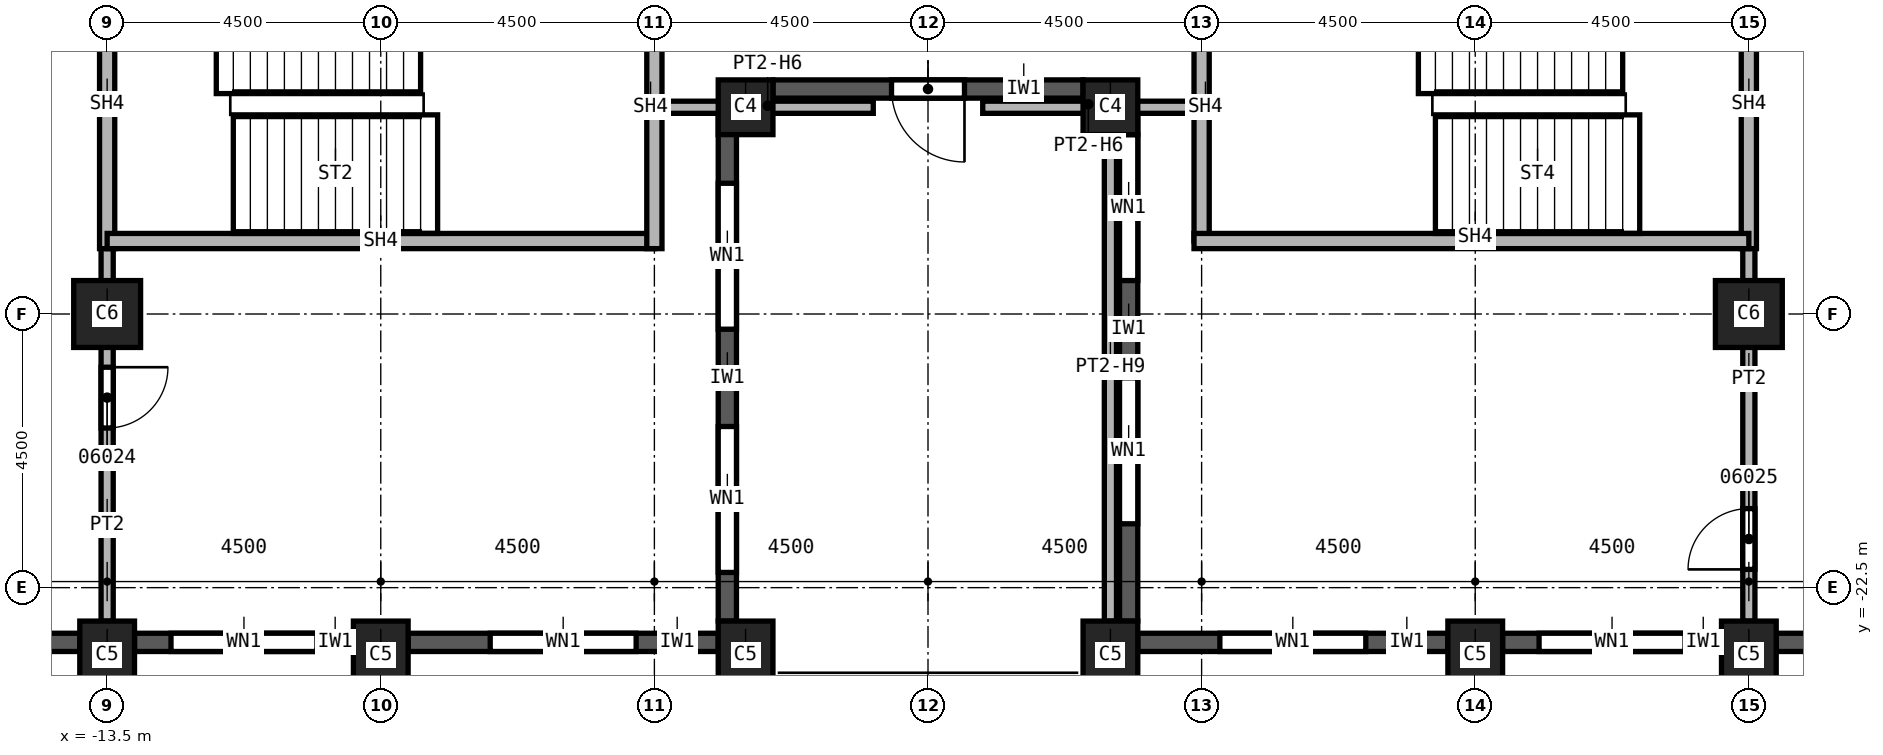
"""IFC4 building model, lengths in metres.
Left out: names, types, materials, properties, quantities, classifications, styles, units other than length and angle.
Written with IfcOpenShell. Run it as: python <this file> out.ifc"""

import sys

from ifc_helpers import new_model, si_unit, direction, frame, frame_2d, origin, origin_2d, place, context, subcontext, project, spatial, rectangle, extrude, element, fill, save


model = new_model("IFC4")
c1 = context("Model", 3, precision=1e-05, world=origin(), true_north=direction((0.0, 1.0)))
c2 = subcontext(c1, "Body", "Model", "MODEL_VIEW")
j1 = project(units=[si_unit("LENGTHUNIT", "METRE"), si_unit("PLANEANGLEUNIT", "RADIAN")], contexts=[c1])
p1 = place(None, origin())
s1 = spatial("IfcSite", under=j1, at=p1, CompositionType="ELEMENT")
p2 = place(p1, origin())
s2 = spatial("IfcBuilding", under=s1, at=p2, CompositionType="ELEMENT")
p3 = place(p2, frame((0.0, 0.0, 126.0)))
s3 = spatial("IfcBuildingStorey", under=s2, at=p3, CompositionType="ELEMENT", Elevation=126.0)
for number, where, z_axis, x_axis in (
    (1, (13.5, -18.0, 0.0), (0.0, 0.0, 1.0), (1.0, 0.0, 0.0)),
    (2, (-13.5, -18.0, 0.0), (0.0, 0.0, 1.0), (1.0, 0.0, 0.0)),
):
    element("IfcColumn", number, at=place(p3, frame(where, z_axis=z_axis, x_axis=x_axis)), inside=s3, PredefinedType="COLUMN", context=c2, shape_type="SweptSolid", body=[
        extrude(rectangle(XDim=1.1, YDim=1.1, at=origin_2d()), origin(), (0.0, 0.0, 1.0), 3.7),
    ])
for number, where, z_axis, x_axis in (
    (3, (3.0, -23.6, 0.0), (0.0, 0.0, 1.0), (1.0, 0.0, 0.0)),
    (4, (9.0, -23.6, 0.0), (0.0, 0.0, 1.0), (1.0, 0.0, 0.0)),
    (5, (13.5, -23.6, 0.0), (0.0, 0.0, 1.0), (1.0, 0.0, 0.0)),
    (6, (-3.0, -23.6, 0.0), (0.0, 0.0, 1.0), (1.0, 0.0, 0.0)),
    (7, (-9.0, -23.6, 0.0), (0.0, 0.0, 1.0), (1.0, 0.0, 0.0)),
    (8, (-13.5, -23.6, 0.0), (0.0, 0.0, 1.0), (1.0, 0.0, 0.0)),
):
    element("IfcColumn", number, at=place(p3, frame(where, z_axis=z_axis, x_axis=x_axis)), inside=s3, PredefinedType="COLUMN", context=c2, shape_type="SweptSolid", body=[
        extrude(rectangle(XDim=0.9, YDim=1.1, at=origin_2d()), origin(), (0.0, 0.0, 1.0), 3.7),
    ])
for number, where, z_axis, x_axis in (
    (9, (3.0, -14.6, 0.0), (0.0, 0.0, 1.0), (1.0, 0.0, 0.0)),
    (10, (-3.0, -14.6, 0.0), (0.0, 0.0, 1.0), (1.0, 0.0, 0.0)),
):
    element("IfcColumn", number, at=place(p3, frame(where, z_axis=z_axis, x_axis=x_axis)), inside=s3, PredefinedType="COLUMN", context=c2, shape_type="SweptSolid", body=[
        extrude(rectangle(XDim=0.9, YDim=0.9, at=origin_2d()), origin(), (0.0, 0.0, 1.0), 3.7),
    ])
p4 = place(p3, frame((-17.55, -23.4, 0.0), z_axis=(0.0, 0.0, 1.0), x_axis=(1.0, 0.0, 0.0)))
e11 = element("IfcWall", 11, at=p4, inside=s3, PredefinedType="SOLIDWALL", context=c2, shape_type="SweptSolid", body=[
    extrude(rectangle(XDim=3.6, YDim=0.3, at=frame_2d((1.8, 0.0))), origin(), (0.0, 0.0, 1.0), 3.1),
])
p5 = place(p4, frame((0.775, 0.0, 0.8)))
e12 = element("IfcOpeningElement", 12, at=p5, cuts=e11, PredefinedType="OPENING", context=c2, shape_type="SweptSolid", body=[
    extrude(rectangle(XDim=1.0, YDim=1.95, at=frame_2d((0.5, 0.975))), frame((0.0, 0.15, 0.0), z_axis=(0.0, -1.0, 0.0), x_axis=(1.0, 0.0, 0.0)), (0.0, 0.0, 1.0), 0.3),
])
p6 = place(p4, frame((2.375, 0.0, 0.8)))
e13 = element("IfcOpeningElement", 13, at=p6, cuts=e11, PredefinedType="OPENING", context=c2, shape_type="SweptSolid", body=[
    extrude(rectangle(XDim=0.6, YDim=1.95, at=frame_2d((0.3, 0.975))), frame((0.0, 0.15, 0.0), z_axis=(0.0, -1.0, 0.0), x_axis=(1.0, 0.0, 0.0)), (0.0, 0.0, 1.0), 0.3),
])
p7 = place(p3, frame((-13.05, -23.4, 0.0), z_axis=(0.0, 0.0, 1.0), x_axis=(1.0, 0.0, 0.0)))
e14 = element("IfcWall", 14, at=p7, inside=s3, PredefinedType="SOLIDWALL", context=c2, shape_type="SweptSolid", body=[
    extrude(rectangle(XDim=3.6, YDim=0.3, at=frame_2d((1.8, 0.0))), origin(), (0.0, 0.0, 1.0), 3.1),
])
p8 = place(p7, frame((0.6, 0.0, 0.8)))
e15 = element("IfcOpeningElement", 15, at=p8, cuts=e14, PredefinedType="OPENING", context=c2, shape_type="SweptSolid", body=[
    extrude(rectangle(XDim=2.4, YDim=1.95, at=frame_2d((1.2, 0.975))), frame((0.0, 0.15, 0.0), z_axis=(0.0, -1.0, 0.0), x_axis=(1.0, 0.0, 0.0)), (0.0, 0.0, 1.0), 0.3),
])
p9 = place(p3, frame((-8.55, -23.4, 0.0), z_axis=(0.0, 0.0, 1.0), x_axis=(1.0, 0.0, 0.0)))
e16 = element("IfcWall", 16, at=p9, inside=s3, PredefinedType="SOLIDWALL", context=c2, shape_type="SweptSolid", body=[
    extrude(rectangle(XDim=5.1, YDim=0.3, at=frame_2d((2.55, 0.0))), origin(), (0.0, 0.0, 1.0), 3.1),
])
p10 = place(p9, frame((1.35, 0.0, 0.8)))
e17 = element("IfcOpeningElement", 17, at=p10, cuts=e16, PredefinedType="OPENING", context=c2, shape_type="SweptSolid", body=[
    extrude(rectangle(XDim=2.4, YDim=1.95, at=frame_2d((1.2, 0.975))), frame((0.0, 0.15, 0.0), z_axis=(0.0, -1.0, 0.0), x_axis=(1.0, 0.0, 0.0)), (0.0, 0.0, 1.0), 0.3),
])
p11 = place(p3, frame((-3.3, -23.05, 0.0), z_axis=(0.0, 0.0, 1.0), x_axis=(0.0, 1.0, 0.0)))
e18 = element("IfcWall", 18, at=p11, inside=s3, PredefinedType="SOLIDWALL", context=c2, shape_type="SweptSolid", body=[
    extrude(rectangle(XDim=8.4, YDim=0.3, at=frame_2d((4.2, 0.0))), origin(), (0.0, 0.0, 1.0), 3.1),
])
p12 = place(p11, frame((0.8, 0.0, 0.8)))
e19 = element("IfcOpeningElement", 19, at=p12, cuts=e18, PredefinedType="OPENING", context=c2, shape_type="SweptSolid", body=[
    extrude(rectangle(XDim=2.4, YDim=1.95, at=frame_2d((1.2, 0.975))), frame((0.0, 0.15, 0.0), z_axis=(0.0, -1.0, 0.0), x_axis=(1.0, 0.0, 0.0)), (0.0, 0.0, 1.0), 0.3),
])
p13 = place(p11, frame((4.8, 0.0, 0.8)))
e20 = element("IfcOpeningElement", 20, at=p13, cuts=e18, PredefinedType="OPENING", context=c2, shape_type="SweptSolid", body=[
    extrude(rectangle(XDim=2.4, YDim=1.95, at=frame_2d((1.2, 0.975))), frame((0.0, 0.15, 0.0), z_axis=(0.0, -1.0, 0.0), x_axis=(1.0, 0.0, 0.0)), (0.0, 0.0, 1.0), 0.3),
])
p14 = place(p3, frame((2.55, -14.3, 0.0), z_axis=(0.0, 0.0, 1.0), x_axis=(-1.0, 0.0, 0.0)))
e21 = element("IfcWall", 21, at=p14, inside=s3, PredefinedType="SOLIDWALL", context=c2, shape_type="SweptSolid", body=[
    extrude(rectangle(XDim=5.1, YDim=0.3, at=frame_2d((2.55, 0.0))), origin(), (0.0, 0.0, 1.0), 3.1),
])
p15 = place(p14, frame((1.95, 0.0, 0.0)))
e22 = element("IfcOpeningElement", 22, at=p15, cuts=e21, PredefinedType="OPENING", context=c2, shape_type="SweptSolid", body=[
    extrude(rectangle(XDim=1.2, YDim=2.4, at=frame_2d((0.6, 1.2))), frame((0.0, 0.15, 0.0), z_axis=(0.0, -1.0, 0.0), x_axis=(1.0, 0.0, 0.0)), (0.0, 0.0, 1.0), 0.3),
])
p16 = place(p3, frame((3.3, -14.65, 0.0), z_axis=(0.0, 0.0, 1.0), x_axis=(0.0, -1.0, 0.0)))
e23 = element("IfcWall", 23, at=p16, inside=s3, PredefinedType="SOLIDWALL", context=c2, shape_type="SweptSolid", body=[
    extrude(rectangle(XDim=8.4, YDim=0.3, at=frame_2d((4.2, 0.0))), origin(), (0.0, 0.0, 1.0), 3.1),
])
p17 = place(p16, frame((0.4, 0.0, 0.8)))
e24 = element("IfcOpeningElement", 24, at=p17, cuts=e23, PredefinedType="OPENING", context=c2, shape_type="SweptSolid", body=[
    extrude(rectangle(XDim=2.4, YDim=1.95, at=frame_2d((1.2, 0.975))), frame((0.0, 0.15, 0.0), z_axis=(0.0, -1.0, 0.0), x_axis=(1.0, 0.0, 0.0)), (0.0, 0.0, 1.0), 0.3),
])
p18 = place(p16, frame((4.4, 0.0, 0.8)))
e25 = element("IfcOpeningElement", 25, at=p18, cuts=e23, PredefinedType="OPENING", context=c2, shape_type="SweptSolid", body=[
    extrude(rectangle(XDim=2.4, YDim=1.95, at=frame_2d((1.2, 0.975))), frame((0.0, 0.15, 0.0), z_axis=(0.0, -1.0, 0.0), x_axis=(1.0, 0.0, 0.0)), (0.0, 0.0, 1.0), 0.3),
])
p19 = place(p3, frame((3.45, -23.4, 0.0), z_axis=(0.0, 0.0, 1.0), x_axis=(1.0, 0.0, 0.0)))
e26 = element("IfcWall", 26, at=p19, inside=s3, PredefinedType="SOLIDWALL", context=c2, shape_type="SweptSolid", body=[
    extrude(rectangle(XDim=5.1, YDim=0.3, at=frame_2d((2.55, 0.0))), origin(), (0.0, 0.0, 1.0), 3.1),
])
p20 = place(p19, frame((1.35, 0.0, 0.8)))
e27 = element("IfcOpeningElement", 27, at=p20, cuts=e26, PredefinedType="OPENING", context=c2, shape_type="SweptSolid", body=[
    extrude(rectangle(XDim=2.4, YDim=1.95, at=frame_2d((1.2, 0.975))), frame((0.0, 0.15, 0.0), z_axis=(0.0, -1.0, 0.0), x_axis=(1.0, 0.0, 0.0)), (0.0, 0.0, 1.0), 0.3),
])
p21 = place(p3, frame((9.45, -23.4, 0.0), z_axis=(0.0, 0.0, 1.0), x_axis=(1.0, 0.0, 0.0)))
e28 = element("IfcWall", 28, at=p21, inside=s3, PredefinedType="SOLIDWALL", context=c2, shape_type="SweptSolid", body=[
    extrude(rectangle(XDim=3.6, YDim=0.3, at=frame_2d((1.8, 0.0))), origin(), (0.0, 0.0, 1.0), 3.1),
])
p22 = place(p21, frame((0.6, 0.0, 0.8)))
e29 = element("IfcOpeningElement", 29, at=p22, cuts=e28, PredefinedType="OPENING", context=c2, shape_type="SweptSolid", body=[
    extrude(rectangle(XDim=2.4, YDim=1.95, at=frame_2d((1.2, 0.975))), frame((0.0, 0.15, 0.0), z_axis=(0.0, -1.0, 0.0), x_axis=(1.0, 0.0, 0.0)), (0.0, 0.0, 1.0), 0.3),
])
p23 = place(p3, frame((13.95, -23.4, 0.0), z_axis=(0.0, 0.0, 1.0), x_axis=(1.0, 0.0, 0.0)))
e30 = element("IfcWall", 30, at=p23, inside=s3, PredefinedType="SOLIDWALL", context=c2, shape_type="SweptSolid", body=[
    extrude(rectangle(XDim=3.6, YDim=0.3, at=frame_2d((1.8, 0.0))), origin(), (0.0, 0.0, 1.0), 3.1),
])
p24 = place(p23, frame((0.625, 0.0, 0.8)))
e31 = element("IfcOpeningElement", 31, at=p24, cuts=e30, PredefinedType="OPENING", context=c2, shape_type="SweptSolid", body=[
    extrude(rectangle(XDim=0.6, YDim=1.95, at=frame_2d((0.3, 0.975))), frame((0.0, 0.15, 0.0), z_axis=(0.0, -1.0, 0.0), x_axis=(1.0, 0.0, 0.0)), (0.0, 0.0, 1.0), 0.3),
])
p25 = place(p23, frame((1.825, 0.0, 0.8)))
e32 = element("IfcOpeningElement", 32, at=p25, cuts=e30, PredefinedType="OPENING", context=c2, shape_type="SweptSolid", body=[
    extrude(rectangle(XDim=1.0, YDim=1.95, at=frame_2d((0.5, 0.975))), frame((0.0, 0.15, 0.0), z_axis=(0.0, -1.0, 0.0), x_axis=(1.0, 0.0, 0.0)), (0.0, 0.0, 1.0), 0.3),
])
p26 = place(p3, frame((-13.5, -16.675, 0.0), z_axis=(0.0, 0.0, 1.0), x_axis=(0.0, -1.0, 0.0)))
e33 = element("IfcWall", 33, at=p26, inside=s3, PredefinedType="PARTITIONING", context=c2, shape_type="SweptSolid", body=[
    extrude(rectangle(XDim=6.375, YDim=0.2, at=frame_2d((3.188, 0.0))), origin(), (0.0, 0.0, 1.0), 3.7),
])
p27 = place(p26, frame((2.2, 0.0, 0.0)))
e34 = element("IfcOpeningElement", 34, at=p27, cuts=e33, PredefinedType="OPENING", context=c2, shape_type="SweptSolid", body=[
    extrude(rectangle(XDim=1.0, YDim=2.1, at=frame_2d((0.5, 1.05))), frame((0.0, 0.1, 0.0), z_axis=(0.0, -1.0, 0.0), x_axis=(1.0, 0.0, 0.0)), (0.0, 0.0, 1.0), 0.2),
])
p28 = place(p3, frame((-0.9, -14.6, 0.0), z_axis=(0.0, 0.0, 1.0), x_axis=(-1.0, 0.0, 0.0)))
e35 = element("IfcWall", 35, at=p28, inside=s3, PredefinedType="PARTITIONING", context=c2, shape_type="SweptSolid", body=[
    extrude(rectangle(XDim=3.6, YDim=0.2, at=frame_2d((1.8, 0.0))), origin(), (0.0, 0.0, 1.0), 3.088),
])
p29 = place(p3, frame((3.0, -14.6, 0.0), z_axis=(0.0, 0.0, 1.0), x_axis=(0.0, -1.0, 0.0)))
e36 = element("IfcWall", 36, at=p29, inside=s3, PredefinedType="PARTITIONING", context=c2, shape_type="SweptSolid", body=[
    extrude(rectangle(XDim=8.45, YDim=0.2, at=frame_2d((4.225, 0.0))), origin(), (0.0, 0.0, 1.0), 2.854),
])
p30 = place(p3, frame((4.5, -14.6, 0.0), z_axis=(0.0, 0.0, 1.0), x_axis=(-1.0, 0.0, 0.0)))
e37 = element("IfcWall", 37, at=p30, inside=s3, PredefinedType="PARTITIONING", context=c2, shape_type="SweptSolid", body=[
    extrude(rectangle(XDim=3.6, YDim=0.2, at=frame_2d((1.8, 0.0))), origin(), (0.0, 0.0, 1.0), 3.088),
])
p31 = place(p3, frame((13.5, -23.05, 0.0), z_axis=(0.0, 0.0, 1.0), x_axis=(0.0, 1.0, 0.0)))
e38 = element("IfcWall", 38, at=p31, inside=s3, PredefinedType="PARTITIONING", context=c2, shape_type="SweptSolid", body=[
    extrude(rectangle(XDim=6.375, YDim=0.2, at=frame_2d((3.188, 0.0))), origin(), (0.0, 0.0, 1.0), 3.7),
])
p32 = place(p31, frame((0.85, 0.0, 0.0)))
e39 = element("IfcOpeningElement", 39, at=p32, cuts=e38, PredefinedType="OPENING", context=c2, shape_type="SweptSolid", body=[
    extrude(rectangle(XDim=1.0, YDim=2.1, at=frame_2d((0.5, 1.05))), frame((0.0, 0.1, 0.0), z_axis=(0.0, -1.0, 0.0), x_axis=(1.0, 0.0, 0.0)), (0.0, 0.0, 1.0), 0.2),
])
p33 = place(p3, frame((-13.5, -12.175, 0.0), z_axis=(0.0, 0.0, 1.0), x_axis=(0.0, -1.0, 0.0)))
e40 = element("IfcWall", 40, at=p33, inside=s3, PredefinedType="SOLIDWALL", context=c2, shape_type="SweptSolid", body=[
    extrude(rectangle(XDim=4.75, YDim=0.25, at=frame_2d((2.375, 0.0))), origin(), (0.0, 0.0, 1.0), 3.7),
])
p34 = place(p3, frame((-4.5, -16.8, 0.0), z_axis=(0.0, 0.0, 1.0), x_axis=(-1.0, 0.0, 0.0)))
e41 = element("IfcWall", 41, at=p34, inside=s3, PredefinedType="SOLIDWALL", context=c2, shape_type="SweptSolid", body=[
    extrude(rectangle(XDim=9.0, YDim=0.25, at=frame_2d((4.5, 0.0))), origin(), (0.0, 0.0, 1.0), 3.7),
])
p35 = place(p3, frame((-4.5, -12.3, 0.0), z_axis=(0.0, 0.0, 1.0), x_axis=(0.0, -1.0, 0.0)))
e42 = element("IfcWall", 42, at=p35, inside=s3, PredefinedType="SOLIDWALL", context=c2, shape_type="SweptSolid", body=[
    extrude(rectangle(XDim=4.625, YDim=0.25, at=frame_2d((2.312, 0.0))), origin(), (0.0, 0.0, 1.0), 3.7),
])
p36 = place(p3, frame((4.5, -16.8, 0.0), z_axis=(0.0, 0.0, 1.0), x_axis=(0.0, 1.0, 0.0)))
e43 = element("IfcWall", 43, at=p36, inside=s3, PredefinedType="SOLIDWALL", context=c2, shape_type="SweptSolid", body=[
    extrude(rectangle(XDim=4.5, YDim=0.25, at=frame_2d((2.25, 0.0))), origin(), (0.0, 0.0, 1.0), 3.7),
])
p37 = place(p3, frame((13.5, -16.925, 0.0), z_axis=(0.0, 0.0, 1.0), x_axis=(0.0, 1.0, 0.0)))
e44 = element("IfcWall", 44, at=p37, inside=s3, PredefinedType="SOLIDWALL", context=c2, shape_type="SweptSolid", body=[
    extrude(rectangle(XDim=4.75, YDim=0.25, at=frame_2d((2.375, 0.0))), origin(), (0.0, 0.0, 1.0), 3.7),
])
p38 = place(p3, frame((13.5, -16.8, 0.0), z_axis=(0.0, 0.0, 1.0), x_axis=(-1.0, 0.0, 0.0)))
e45 = element("IfcWall", 45, at=p38, inside=s3, PredefinedType="SOLIDWALL", context=c2, shape_type="SweptSolid", body=[
    extrude(rectangle(XDim=9.125, YDim=0.25, at=frame_2d((4.562, 0.0))), origin(), (0.0, 0.0, 1.0), 3.7),
])
p39 = place(p8, origin())
e46 = element("IfcWindow", 46, at=p39, inside=s3, PartitioningType="SINGLE_PANEL", PredefinedType="WINDOW", context=c2, shape_type="SweptSolid", body=[
    extrude(rectangle(XDim=2.4, YDim=1.95, at=frame_2d((1.2, 0.975))), frame((0.0, 0.03, 0.0), z_axis=(0.0, -1.0, 0.0), x_axis=(1.0, 0.0, 0.0)), (0.0, 0.0, 1.0), 0.06),
])
fill(e15, e46)
p40 = place(p10, origin())
e47 = element("IfcWindow", 47, at=p40, inside=s3, PartitioningType="SINGLE_PANEL", PredefinedType="WINDOW", context=c2, shape_type="SweptSolid", body=[
    extrude(rectangle(XDim=2.4, YDim=1.95, at=frame_2d((1.2, 0.975))), frame((0.0, 0.03, 0.0), z_axis=(0.0, -1.0, 0.0), x_axis=(1.0, 0.0, 0.0)), (0.0, 0.0, 1.0), 0.06),
])
fill(e17, e47)
p41 = place(p12, origin())
e48 = element("IfcWindow", 48, at=p41, inside=s3, PartitioningType="SINGLE_PANEL", PredefinedType="WINDOW", context=c2, shape_type="SweptSolid", body=[
    extrude(rectangle(XDim=2.4, YDim=1.95, at=frame_2d((1.2, 0.975))), frame((0.0, 0.03, 0.0), z_axis=(0.0, -1.0, 0.0), x_axis=(1.0, 0.0, 0.0)), (0.0, 0.0, 1.0), 0.06),
])
fill(e19, e48)
p42 = place(p13, origin())
e49 = element("IfcWindow", 49, at=p42, inside=s3, PartitioningType="SINGLE_PANEL", PredefinedType="WINDOW", context=c2, shape_type="SweptSolid", body=[
    extrude(rectangle(XDim=2.4, YDim=1.95, at=frame_2d((1.2, 0.975))), frame((0.0, 0.03, 0.0), z_axis=(0.0, -1.0, 0.0), x_axis=(1.0, 0.0, 0.0)), (0.0, 0.0, 1.0), 0.06),
])
fill(e20, e49)
p43 = place(p15, origin())
e50 = element("IfcDoor", 50, at=p43, inside=s3, OperationType="SINGLE_SWING_LEFT", PredefinedType="DOOR", context=c2, shape_type="SweptSolid", body=[
    extrude(rectangle(XDim=1.2, YDim=2.4, at=frame_2d((0.6, 1.2))), frame((0.0, 0.025, 0.0), z_axis=(0.0, -1.0, 0.0), x_axis=(1.0, 0.0, 0.0)), (0.0, 0.0, 1.0), 0.05),
])
fill(e22, e50)
p44 = place(p17, origin())
e51 = element("IfcWindow", 51, at=p44, inside=s3, PartitioningType="SINGLE_PANEL", PredefinedType="WINDOW", context=c2, shape_type="SweptSolid", body=[
    extrude(rectangle(XDim=2.4, YDim=1.95, at=frame_2d((1.2, 0.975))), frame((0.0, 0.03, 0.0), z_axis=(0.0, -1.0, 0.0), x_axis=(1.0, 0.0, 0.0)), (0.0, 0.0, 1.0), 0.06),
])
fill(e24, e51)
p45 = place(p18, origin())
e52 = element("IfcWindow", 52, at=p45, inside=s3, PartitioningType="SINGLE_PANEL", PredefinedType="WINDOW", context=c2, shape_type="SweptSolid", body=[
    extrude(rectangle(XDim=2.4, YDim=1.95, at=frame_2d((1.2, 0.975))), frame((0.0, 0.03, 0.0), z_axis=(0.0, -1.0, 0.0), x_axis=(1.0, 0.0, 0.0)), (0.0, 0.0, 1.0), 0.06),
])
fill(e25, e52)
p46 = place(p20, origin())
e53 = element("IfcWindow", 53, at=p46, inside=s3, PartitioningType="SINGLE_PANEL", PredefinedType="WINDOW", context=c2, shape_type="SweptSolid", body=[
    extrude(rectangle(XDim=2.4, YDim=1.95, at=frame_2d((1.2, 0.975))), frame((0.0, 0.03, 0.0), z_axis=(0.0, -1.0, 0.0), x_axis=(1.0, 0.0, 0.0)), (0.0, 0.0, 1.0), 0.06),
])
fill(e27, e53)
p47 = place(p22, origin())
e54 = element("IfcWindow", 54, at=p47, inside=s3, PartitioningType="SINGLE_PANEL", PredefinedType="WINDOW", context=c2, shape_type="SweptSolid", body=[
    extrude(rectangle(XDim=2.4, YDim=1.95, at=frame_2d((1.2, 0.975))), frame((0.0, 0.03, 0.0), z_axis=(0.0, -1.0, 0.0), x_axis=(1.0, 0.0, 0.0)), (0.0, 0.0, 1.0), 0.06),
])
fill(e29, e54)
p48 = place(p27, origin())
e55 = element("IfcDoor", 55, at=p48, inside=s3, OperationType="SINGLE_SWING_LEFT", PredefinedType="DOOR", context=c2, shape_type="SweptSolid", body=[
    extrude(rectangle(XDim=1.0, YDim=2.1, at=frame_2d((0.5, 1.05))), frame((0.0, 0.025, 0.0), z_axis=(0.0, -1.0, 0.0), x_axis=(1.0, 0.0, 0.0)), (0.0, 0.0, 1.0), 0.05),
])
fill(e34, e55)
p49 = place(p32, origin())
e56 = element("IfcDoor", 56, at=p49, inside=s3, OperationType="SINGLE_SWING_RIGHT", PredefinedType="DOOR", context=c2, shape_type="SweptSolid", body=[
    extrude(rectangle(XDim=1.0, YDim=2.1, at=frame_2d((0.5, 1.05))), frame((0.0, 0.025, 0.0), z_axis=(0.0, -1.0, 0.0), x_axis=(1.0, 0.0, 0.0)), (0.0, 0.0, 1.0), 0.05),
])
fill(e39, e56)
save(model, sys.argv[1])
